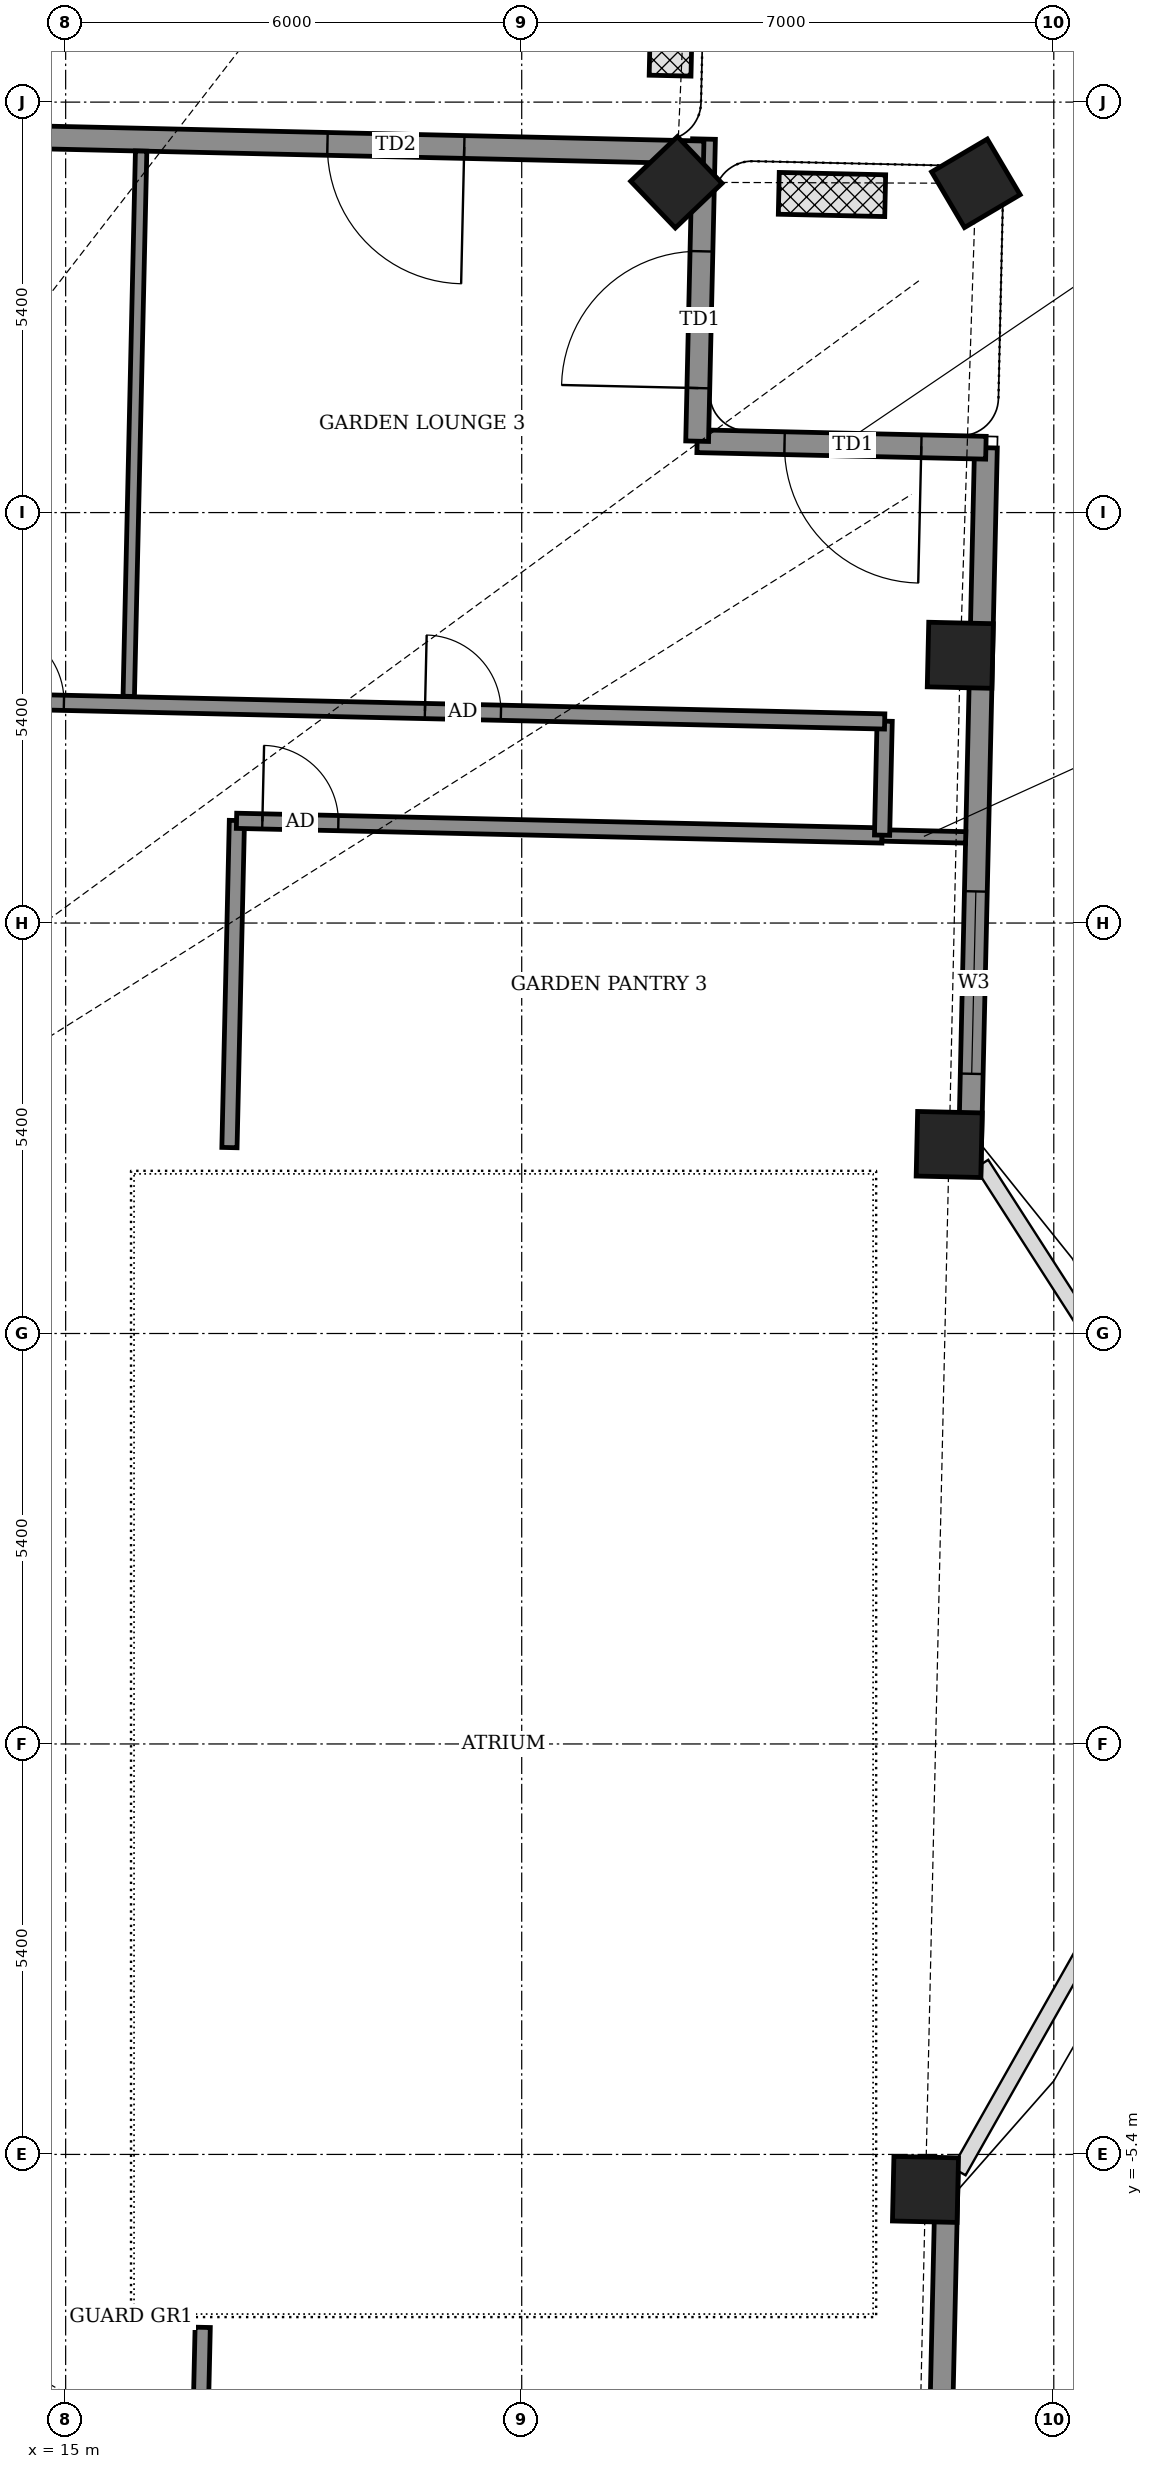
"""IFC4 building model, lengths in metres.
Left out: names, types, materials, properties, quantities, classifications, styles, units other than length and angle.
Written with IfcOpenShell. Run it as: python <this file> out.ifc"""

import sys

from ifc_helpers import new_model, si_unit, direction, frame, frame_2d, origin, origin_2d, place, context, subcontext, project, spatial, rectangle, extrude, element, fill, save


model = new_model("IFC4")
c1 = context("Model", 3, precision=1e-05, world=origin(), true_north=direction((0.0, 1.0)))
c2 = subcontext(c1, "Body", "Model", "MODEL_VIEW")
j1 = project(units=[si_unit("LENGTHUNIT", "METRE"), si_unit("PLANEANGLEUNIT", "RADIAN")], contexts=[c1])
p1 = place(None, origin())
s1 = spatial("IfcSite", under=j1, at=p1, CompositionType="ELEMENT")
p2 = place(p1, origin())
s2 = spatial("IfcBuilding", under=s1, at=p2, CompositionType="ELEMENT")
p3 = place(p2, frame((0.0, 0.0, 337.9)))
s3 = spatial("IfcBuildingStorey", under=s2, at=p3, CompositionType="ELEMENT", Elevation=337.9)
for number, where, z_axis, x_axis in (
    (1, (26.312, -5.86, -0.55), (0.0, 0.0, 1.0), (0.023, 1.0, 0.0)),
    (2, (26.624, 7.887, -0.55), (0.0, 0.0, 1.0), (0.023, 1.0, 0.0)),
    (3, (26.77, 14.323, -0.55), (0.0, 0.0, 1.0), (0.023, 1.0, 0.0)),
    (4, (26.975, 20.532, -0.55), (0.0, 0.0, 1.0), (-0.508, 0.861, 0.0)),
    (5, (23.035, 20.545, -0.55), (0.0, 0.0, 1.0), (-0.691, 0.723, 0.0)),
):
    element("IfcColumn", number, at=place(p3, frame(where, z_axis=z_axis, x_axis=x_axis)), inside=s3, PredefinedType="COLUMN", context=c2, shape_type="SweptSolid", body=[
        extrude(rectangle(XDim=0.85, YDim=0.85, at=origin_2d()), origin(), (0.0, 0.0, 1.0), 4.6),
    ])
p4 = place(p3, frame((26.379, -15.039, 0.0), z_axis=(0.0, 0.0, 1.0), x_axis=(0.022668695782, 0.9997430321, 0.0)))
e6 = element("IfcWall", 6, at=p4, inside=s3, PredefinedType="SOLIDWALL", context=c2, shape_type="SweptSolid", body=[
    extrude(rectangle(XDim=9.574, YDim=0.3, at=frame_2d((4.787, 0.0))), origin(), (0.0, 0.0, 1.0), 2.75),
])
p5 = place(p4, frame((3.752, 0.0, 0.9)))
e7 = element("IfcOpeningElement", 7, at=p5, cuts=e6, PredefinedType="OPENING", context=c2, shape_type="SweptSolid", body=[
    extrude(rectangle(XDim=2.4, YDim=1.8, at=frame_2d((1.2, 0.9))), frame((0.0, 0.16, 0.0), z_axis=(0.0, -1.0, 0.0), x_axis=(1.0, 0.0, 0.0)), (0.0, 0.0, 1.0), 0.32),
])
p6 = place(p3, frame((26.89, 7.48, 0.0), z_axis=(0.0, 0.0, 1.0), x_axis=(0.022666384487, 0.999743084504, 0.0)))
e8 = element("IfcWall", 8, at=p6, inside=s3, PredefinedType="SOLIDWALL", context=c2, shape_type="SweptSolid", body=[
    extrude(rectangle(XDim=9.575, YDim=0.3, at=frame_2d((4.788, 0.0))), origin(), (0.0, 0.0, 1.0), 2.75),
])
p7 = place(p6, frame((1.337, 0.0, 0.9)))
e9 = element("IfcOpeningElement", 9, at=p7, cuts=e8, PredefinedType="OPENING", context=c2, shape_type="SweptSolid", body=[
    extrude(rectangle(XDim=2.4, YDim=1.8, at=frame_2d((1.2, 0.9))), frame((0.0, 0.16, 0.0), z_axis=(0.0, -1.0, 0.0), x_axis=(1.0, 0.0, 0.0)), (0.0, 0.0, 1.0), 0.32),
])
p8 = place(p3, frame((27.107, 17.053, 0.0), z_axis=(0.0, 0.0, 1.0), x_axis=(-0.999744218285, 0.022616321648, 0.0)))
e10 = element("IfcWall", 10, at=p8, inside=s3, PredefinedType="SOLIDWALL", context=c2, shape_type="SweptSolid", body=[
    extrude(rectangle(XDim=3.8, YDim=0.3, at=frame_2d((1.9, 0.0))), origin(), (0.0, 0.0, 1.0), 2.55),
])
p9 = place(p8, frame((0.85, 0.0, 0.0)))
e11 = element("IfcOpeningElement", 11, at=p9, cuts=e10, PredefinedType="OPENING", context=c2, shape_type="SweptSolid", body=[
    extrude(rectangle(XDim=1.8, YDim=2.4, at=frame_2d((0.9, 1.2))), frame((0.0, 0.16, 0.0), z_axis=(0.0, -1.0, 0.0), x_axis=(1.0, 0.0, 0.0)), (0.0, 0.0, 1.0), 0.32),
])
p10 = place(p3, frame((23.308, 17.139, 0.0), z_axis=(0.0, 0.0, 1.0), x_axis=(0.022595875351, 0.999744680615, 0.0)))
e12 = element("IfcWall", 12, at=p10, inside=s3, PredefinedType="SOLIDWALL", context=c2, shape_type="SweptSolid", body=[
    extrude(rectangle(XDim=3.976, YDim=0.3, at=frame_2d((1.988, 0.0))), origin(), (0.0, 0.0, 1.0), 2.55),
])
p11 = place(p10, frame((0.699, 0.0, 0.0)))
e13 = element("IfcOpeningElement", 13, at=p11, cuts=e12, PredefinedType="OPENING", context=c2, shape_type="SweptSolid", body=[
    extrude(rectangle(XDim=1.8, YDim=2.4, at=frame_2d((0.9, 1.2))), frame((0.0, 0.16, 0.0), z_axis=(0.0, -1.0, 0.0), x_axis=(1.0, 0.0, 0.0)), (0.0, 0.0, 1.0), 0.32),
])
p12 = place(p3, frame((23.394, 20.938, 0.0), z_axis=(0.0, 0.0, 1.0), x_axis=(-0.99974255281, 0.02268982375, 0.0)))
e14 = element("IfcWall", 14, at=p12, inside=s3, PredefinedType="SOLIDWALL", context=c2, shape_type="SweptSolid", body=[
    extrude(rectangle(XDim=43.9, YDim=0.3, at=frame_2d((21.95, 0.0))), origin(), (0.0, 0.0, 1.0), 2.1),
])
p13 = place(p12, frame((3.151, 0.0, 0.0)))
e15 = element("IfcOpeningElement", 15, at=p13, cuts=e14, PredefinedType="OPENING", context=c2, shape_type="SweptSolid", body=[
    extrude(rectangle(XDim=1.8, YDim=2.0, at=frame_2d((0.9, 1.0))), frame((0.0, 0.16, 0.0), z_axis=(0.0, -1.0, 0.0), x_axis=(1.0, 0.0, 0.0)), (0.0, 0.0, 1.0), 0.32),
])
p14 = place(p12, frame((8.825, 0.0, 0.0)))
e16 = element("IfcOpeningElement", 16, at=p14, cuts=e14, PredefinedType="OPENING", context=c2, shape_type="SweptSolid", body=[
    extrude(rectangle(XDim=1.8, YDim=2.0, at=frame_2d((0.9, 1.0))), frame((0.0, 0.16, 0.0), z_axis=(0.0, -1.0, 0.0), x_axis=(1.0, 0.0, 0.0)), (0.0, 0.0, 1.0), 0.32),
])
p15 = place(p12, frame((13.3, 0.0, 0.0)))
e17 = element("IfcOpeningElement", 17, at=p15, cuts=e14, PredefinedType="OPENING", context=c2, shape_type="SweptSolid", body=[
    extrude(rectangle(XDim=1.8, YDim=2.0, at=frame_2d((0.9, 1.0))), frame((0.0, 0.16, 0.0), z_axis=(0.0, -1.0, 0.0), x_axis=(1.0, 0.0, 0.0)), (0.0, 0.0, 1.0), 0.32),
])
p16 = place(p12, frame((19.275, 0.0, 0.0)))
e18 = element("IfcOpeningElement", 18, at=p16, cuts=e14, PredefinedType="OPENING", context=c2, shape_type="SweptSolid", body=[
    extrude(rectangle(XDim=1.8, YDim=2.0, at=frame_2d((0.9, 1.0))), frame((0.0, 0.16, 0.0), z_axis=(0.0, -1.0, 0.0), x_axis=(1.0, 0.0, 0.0)), (0.0, 0.0, 1.0), 0.32),
])
p17 = place(p12, frame((26.55, 0.0, 0.0)))
e19 = element("IfcOpeningElement", 19, at=p17, cuts=e14, PredefinedType="OPENING", context=c2, shape_type="SweptSolid", body=[
    extrude(rectangle(XDim=1.8, YDim=2.0, at=frame_2d((0.9, 1.0))), frame((0.0, 0.16, 0.0), z_axis=(0.0, -1.0, 0.0), x_axis=(1.0, 0.0, 0.0)), (0.0, 0.0, 1.0), 0.32),
])
p18 = place(p12, frame((33.825, 0.0, 0.0)))
e20 = element("IfcOpeningElement", 20, at=p18, cuts=e14, PredefinedType="OPENING", context=c2, shape_type="SweptSolid", body=[
    extrude(rectangle(XDim=1.8, YDim=2.0, at=frame_2d((0.9, 1.0))), frame((0.0, 0.16, 0.0), z_axis=(0.0, -1.0, 0.0), x_axis=(1.0, 0.0, 0.0)), (0.0, 0.0, 1.0), 0.32),
])
p19 = place(p12, frame((40.4, 0.0, 0.0)))
e21 = element("IfcOpeningElement", 21, at=p19, cuts=e14, PredefinedType="OPENING", context=c2, shape_type="SweptSolid", body=[
    extrude(rectangle(XDim=1.8, YDim=2.0, at=frame_2d((0.9, 1.0))), frame((0.0, 0.16, 0.0), z_axis=(0.0, -1.0, 0.0), x_axis=(1.0, 0.0, 0.0)), (0.0, 0.0, 1.0), 0.32),
])
for number, where, z_axis, x_axis in (
    (22, (24.382, 20.4, 0.0), (0.0, 0.0, 1.0), (1.0, -0.022, 0.0)),
    (23, (22.983, 23.348, 0.0), (0.0, 0.0, 1.0), (-0.022, -1.0, 0.0)),
):
    element("IfcWall", number, at=place(p3, frame(where, z_axis=z_axis, x_axis=x_axis)), inside=s3, PredefinedType="USERDEFINED", context=c2, shape_type="SweptSolid", body=[
        extrude(rectangle(XDim=1.4, YDim=0.55, at=frame_2d((0.7, 0.0))), origin(), (0.0, 0.0, 1.0), 0.8),
    ])
p20 = place(p3, frame((16.684, -12.919, 0.0), z_axis=(0.0, 0.0, 1.0), x_axis=(0.022667483124, 0.999743059595, 0.0)))
e24 = element("IfcWall", 24, at=p20, inside=s3, PredefinedType="PARTITIONING", context=c2, shape_type="SweptSolid", body=[
    extrude(rectangle(XDim=5.245, YDim=0.2, at=frame_2d((2.623, 0.0))), origin(), (0.0, 0.0, 1.0), 2.65),
])
p21 = place(p20, frame((0.691, 0.0, 0.0)))
e25 = element("IfcOpeningElement", 25, at=p21, cuts=e24, PredefinedType="OPENING", context=c2, shape_type="SweptSolid", body=[
    extrude(rectangle(XDim=1.0, YDim=2.1, at=frame_2d((0.5, 1.05))), frame((0.0, 0.11, 0.0), z_axis=(0.0, -1.0, 0.0), x_axis=(1.0, 0.0, 0.0)), (0.0, 0.0, 1.0), 0.22),
])
p22 = place(p3, frame((17.155, 7.846, 0.0), z_axis=(0.0, 0.0, 1.0), x_axis=(0.022745886685, 0.999741278851, 0.0)))
e26 = element("IfcWall", 26, at=p22, inside=s3, PredefinedType="PARTITIONING", context=c2, shape_type="SweptSolid", body=[
    extrude(rectangle(XDim=4.304, YDim=0.2, at=frame_2d((2.152, 0.0))), origin(), (0.0, 0.0, 1.0), 2.55),
])
p23 = place(p3, frame((17.248, 12.145, 0.0), z_axis=(0.0, 0.0, 1.0), x_axis=(0.999741583257, -0.022732503302, 0.0)))
e27 = element("IfcWall", 27, at=p23, inside=s3, PredefinedType="PARTITIONING", context=c2, shape_type="SweptSolid", body=[
    extrude(rectangle(XDim=8.495, YDim=0.2, at=frame_2d((4.248, 0.0))), origin(), (0.0, 0.0, 1.0), 2.55),
])
p24 = place(p23, frame((0.34, 0.0, 0.0)))
e28 = element("IfcOpeningElement", 28, at=p24, cuts=e27, PredefinedType="OPENING", context=c2, shape_type="SweptSolid", body=[
    extrude(rectangle(XDim=1.0, YDim=2.1, at=frame_2d((0.5, 1.05))), frame((0.0, 0.11, 0.0), z_axis=(0.0, -1.0, 0.0), x_axis=(1.0, 0.0, 0.0)), (0.0, 0.0, 1.0), 0.22),
])
p25 = place(p3, frame((25.741, 11.952, 0.0), z_axis=(0.0, 0.0, 1.0), x_axis=(0.9997438932, -0.022630687329, 0.0)))
e29 = element("IfcWall", 29, at=p25, inside=s3, PredefinedType="PARTITIONING", context=c2, shape_type="SweptSolid", body=[
    extrude(rectangle(XDim=1.1, YDim=0.15, at=frame_2d((0.55, 0.0))), origin(), (0.0, 0.0, 1.0), 2.75),
])
p26 = place(p3, frame((25.741, 11.956, 0.0), z_axis=(0.0, 0.0, 1.0), x_axis=(0.022617910375, 0.999744182344, 0.0)))
e30 = element("IfcWall", 30, at=p26, inside=s3, PredefinedType="PARTITIONING", context=c2, shape_type="SweptSolid", body=[
    extrude(rectangle(XDim=1.5, YDim=0.2, at=frame_2d((0.75, 0.0))), origin(), (0.0, 0.0, 1.0), 4.05),
])
p27 = place(p3, frame((-23.213, 14.564, 0.0), z_axis=(0.0, 0.0, 1.0), x_axis=(0.999742437097, -0.022694921611, 0.0)))
e31 = element("IfcWall", 31, at=p27, inside=s3, PredefinedType="PARTITIONING", context=c2, shape_type="SweptSolid", body=[
    extrude(rectangle(XDim=49.0, YDim=0.2, at=frame_2d((24.5, 0.0))), origin(), (0.0, 0.0, 1.0), 2.1),
])
p28 = place(p27, frame((42.951, 0.0, 0.0)))
e32 = element("IfcOpeningElement", 32, at=p28, cuts=e31, PredefinedType="OPENING", context=c2, shape_type="SweptSolid", body=[
    extrude(rectangle(XDim=1.0, YDim=2.1, at=frame_2d((0.5, 1.05))), frame((0.0, 0.11, 0.0), z_axis=(0.0, -1.0, 0.0), x_axis=(1.0, 0.0, 0.0)), (0.0, 0.0, 1.0), 0.22),
])
p29 = place(p27, frame((37.2, 0.0, 0.0)))
e33 = element("IfcOpeningElement", 33, at=p29, cuts=e31, PredefinedType="OPENING", context=c2, shape_type="SweptSolid", body=[
    extrude(rectangle(XDim=1.0, YDim=2.1, at=frame_2d((0.5, 1.05))), frame((0.0, 0.11, 0.0), z_axis=(0.0, -1.0, 0.0), x_axis=(1.0, 0.0, 0.0)), (0.0, 0.0, 1.0), 0.22),
])
p30 = place(p27, frame((34.6, 0.0, 0.0)))
e34 = element("IfcOpeningElement", 34, at=p30, cuts=e31, PredefinedType="OPENING", context=c2, shape_type="SweptSolid", body=[
    extrude(rectangle(XDim=0.9, YDim=2.1, at=frame_2d((0.45, 1.05))), frame((0.0, 0.11, 0.0), z_axis=(0.0, -1.0, 0.0), x_axis=(1.0, 0.0, 0.0)), (0.0, 0.0, 1.0), 0.22),
])
p31 = place(p27, frame((30.374, 0.0, 0.0)))
e35 = element("IfcOpeningElement", 35, at=p31, cuts=e31, PredefinedType="OPENING", context=c2, shape_type="SweptSolid", body=[
    extrude(rectangle(XDim=1.0, YDim=2.1, at=frame_2d((0.5, 1.05))), frame((0.0, 0.11, 0.0), z_axis=(0.0, -1.0, 0.0), x_axis=(1.0, 0.0, 0.0)), (0.0, 0.0, 1.0), 0.22),
])
p32 = place(p27, frame((25.76, 0.0, 0.0)))
e36 = element("IfcOpeningElement", 36, at=p32, cuts=e31, PredefinedType="OPENING", context=c2, shape_type="SweptSolid", body=[
    extrude(rectangle(XDim=1.0, YDim=2.1, at=frame_2d((0.5, 1.05))), frame((0.0, 0.11, 0.0), z_axis=(0.0, -1.0, 0.0), x_axis=(1.0, 0.0, 0.0)), (0.0, 0.0, 1.0), 0.22),
])
p33 = place(p27, frame((22.65, 0.0, 0.0)))
e37 = element("IfcOpeningElement", 37, at=p33, cuts=e31, PredefinedType="OPENING", context=c2, shape_type="SweptSolid", body=[
    extrude(rectangle(XDim=0.9, YDim=2.1, at=frame_2d((0.45, 1.05))), frame((0.0, 0.11, 0.0), z_axis=(0.0, -1.0, 0.0), x_axis=(1.0, 0.0, 0.0)), (0.0, 0.0, 1.0), 0.22),
])
p34 = place(p27, frame((15.938, 0.0, 0.0)))
e38 = element("IfcOpeningElement", 38, at=p34, cuts=e31, PredefinedType="OPENING", context=c2, shape_type="SweptSolid", body=[
    extrude(rectangle(XDim=1.0, YDim=2.1, at=frame_2d((0.5, 1.05))), frame((0.0, 0.11, 0.0), z_axis=(0.0, -1.0, 0.0), x_axis=(1.0, 0.0, 0.0)), (0.0, 0.0, 1.0), 0.22),
])
p35 = place(p27, frame((20.25, 0.0, 0.0)))
e39 = element("IfcOpeningElement", 39, at=p35, cuts=e31, PredefinedType="OPENING", context=c2, shape_type="SweptSolid", body=[
    extrude(rectangle(XDim=0.9, YDim=2.1, at=frame_2d((0.45, 1.05))), frame((0.0, 0.11, 0.0), z_axis=(0.0, -1.0, 0.0), x_axis=(1.0, 0.0, 0.0)), (0.0, 0.0, 1.0), 0.22),
])
p36 = place(p27, frame((11.214, 0.0, 0.0)))
e40 = element("IfcOpeningElement", 40, at=p36, cuts=e31, PredefinedType="OPENING", context=c2, shape_type="SweptSolid", body=[
    extrude(rectangle(XDim=1.0, YDim=2.1, at=frame_2d((0.5, 1.05))), frame((0.0, 0.11, 0.0), z_axis=(0.0, -1.0, 0.0), x_axis=(1.0, 0.0, 0.0)), (0.0, 0.0, 1.0), 0.22),
])
p37 = place(p27, frame((8.1, 0.0, 0.0)))
e41 = element("IfcOpeningElement", 41, at=p37, cuts=e31, PredefinedType="OPENING", context=c2, shape_type="SweptSolid", body=[
    extrude(rectangle(XDim=0.9, YDim=2.1, at=frame_2d((0.45, 1.05))), frame((0.0, 0.11, 0.0), z_axis=(0.0, -1.0, 0.0), x_axis=(1.0, 0.0, 0.0)), (0.0, 0.0, 1.0), 0.22),
])
p38 = place(p27, frame((1.387, 0.0, 0.0)))
e42 = element("IfcOpeningElement", 42, at=p38, cuts=e31, PredefinedType="OPENING", context=c2, shape_type="SweptSolid", body=[
    extrude(rectangle(XDim=1.0, YDim=2.1, at=frame_2d((0.5, 1.05))), frame((0.0, 0.11, 0.0), z_axis=(0.0, -1.0, 0.0), x_axis=(1.0, 0.0, 0.0)), (0.0, 0.0, 1.0), 0.22),
])
p39 = place(p3, frame((15.83, 13.782, 0.0), z_axis=(0.0, 0.0, 1.0), x_axis=(0.022692810533, 0.999742485018, 0.0)))
e43 = element("IfcWall", 43, at=p39, inside=s3, PredefinedType="PARTITIONING", context=c2, shape_type="SweptSolid", body=[
    extrude(rectangle(XDim=7.176, YDim=0.15, at=frame_2d((3.588, 0.0))), origin(), (0.0, 0.0, 1.0), 2.45),
])
p40 = place(p7, origin())
e44 = element("IfcWindow", 44, at=p40, inside=s3, PartitioningType="DOUBLE_PANEL_VERTICAL", PredefinedType="WINDOW", context=c2, shape_type="SweptSolid", body=[
    extrude(rectangle(XDim=2.4, YDim=1.8, at=frame_2d((1.2, 0.9))), frame((0.0, 0.03, 0.0), z_axis=(0.0, -1.0, 0.0), x_axis=(1.0, 0.0, 0.0)), (0.0, 0.0, 1.0), 0.06),
])
fill(e9, e44)
p41 = place(p9, origin())
e45 = element("IfcDoor", 45, at=p41, inside=s3, OperationType="DOUBLE_DOOR_SINGLE_SWING", PredefinedType="DOOR", context=c2, shape_type="SweptSolid", body=[
    extrude(rectangle(XDim=1.8, YDim=2.4, at=frame_2d((0.9, 1.2))), frame((0.0, 0.025, 0.0), z_axis=(0.0, -1.0, 0.0), x_axis=(1.0, 0.0, 0.0)), (0.0, 0.0, 1.0), 0.05),
])
fill(e11, e45)
p42 = place(p11, origin())
e46 = element("IfcDoor", 46, at=p42, inside=s3, OperationType="DOUBLE_DOOR_SINGLE_SWING", PredefinedType="DOOR", context=c2, shape_type="SweptSolid", body=[
    extrude(rectangle(XDim=1.8, YDim=2.4, at=frame_2d((0.9, 1.2))), frame((0.0, 0.025, 0.0), z_axis=(0.0, -1.0, 0.0), x_axis=(1.0, 0.0, 0.0)), (0.0, 0.0, 1.0), 0.05),
])
fill(e13, e46)
p43 = place(p13, origin())
e47 = element("IfcDoor", 47, at=p43, inside=s3, OperationType="DOUBLE_DOOR_SINGLE_SWING", PredefinedType="DOOR", context=c2, shape_type="SweptSolid", body=[
    extrude(rectangle(XDim=1.8, YDim=2.0, at=frame_2d((0.9, 1.0))), frame((0.0, 0.025, 0.0), z_axis=(0.0, -1.0, 0.0), x_axis=(1.0, 0.0, 0.0)), (0.0, 0.0, 1.0), 0.05),
])
fill(e15, e47)
p44 = place(p24, origin())
e48 = element("IfcDoor", 48, at=p44, inside=s3, OperationType="SINGLE_SWING_LEFT", PredefinedType="DOOR", context=c2, shape_type="SweptSolid", body=[
    extrude(rectangle(XDim=1.0, YDim=2.1, at=frame_2d((0.5, 1.05))), frame((0.0, 0.025, 0.0), z_axis=(0.0, -1.0, 0.0), x_axis=(1.0, 0.0, 0.0)), (0.0, 0.0, 1.0), 0.05),
])
fill(e28, e48)
p45 = place(p28, origin())
e49 = element("IfcDoor", 49, at=p45, inside=s3, OperationType="SINGLE_SWING_RIGHT", PredefinedType="DOOR", context=c2, shape_type="SweptSolid", body=[
    extrude(rectangle(XDim=1.0, YDim=2.1, at=frame_2d((0.5, 1.05))), frame((0.0, 0.025, 0.0), z_axis=(0.0, -1.0, 0.0), x_axis=(1.0, 0.0, 0.0)), (0.0, 0.0, 1.0), 0.05),
])
fill(e32, e49)
p46 = place(p29, origin())
e50 = element("IfcDoor", 50, at=p46, inside=s3, OperationType="SINGLE_SWING_LEFT", PredefinedType="DOOR", context=c2, shape_type="SweptSolid", body=[
    extrude(rectangle(XDim=1.0, YDim=2.1, at=frame_2d((0.5, 1.05))), frame((0.0, 0.025, 0.0), z_axis=(0.0, -1.0, 0.0), x_axis=(1.0, 0.0, 0.0)), (0.0, 0.0, 1.0), 0.05),
])
fill(e33, e50)
save(model, sys.argv[1])
